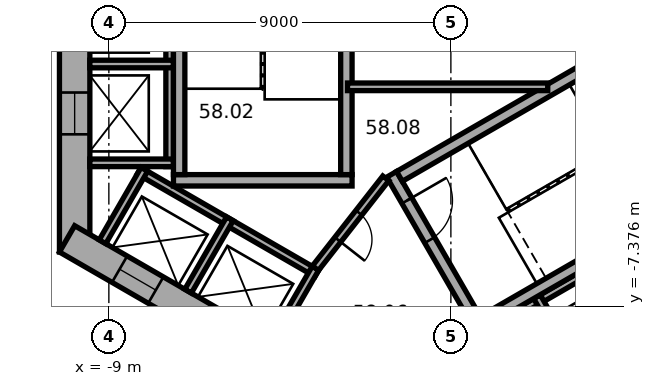
"""IFC4 building model, lengths in metres.
Left out: names, types, materials, properties, quantities, classifications, styles, units other than length and angle.
Written with IfcOpenShell. Run it as: python <this file> out.ifc"""

import sys

from ifc_helpers import new_model, si_unit, direction, frame, frame_2d, origin, place, context, subcontext, project, spatial, rectangle, extrude, element, fill, save


model = new_model("IFC4")
c1 = context("Model", 3, precision=1e-05, world=origin(), true_north=direction((0.0, 1.0)))
c2 = subcontext(c1, "Body", "Model", "MODEL_VIEW")
j1 = project(units=[si_unit("LENGTHUNIT", "METRE"), si_unit("PLANEANGLEUNIT", "RADIAN")], contexts=[c1])
p1 = place(None, origin())
s1 = spatial("IfcSite", under=j1, at=p1, CompositionType="ELEMENT")
p2 = place(p1, origin())
s2 = spatial("IfcBuilding", under=s1, at=p2, CompositionType="ELEMENT")
p3 = place(p2, frame((0.0, 0.0, 236.5)))
s3 = spatial("IfcBuildingStorey", under=s2, at=p3, CompositionType="ELEMENT", Elevation=236.5)
p4 = place(p3, frame((-9.9, 5.947, 0.0), z_axis=(0.0, 0.0, 1.0), x_axis=(0.0, -1.0, 0.0)))
e1 = element("IfcWall", 1, at=p4, inside=s3, PredefinedType="SHEAR", context=c2, shape_type="SweptSolid", body=[
    extrude(rectangle(XDim=11.894, YDim=0.8, at=frame_2d((5.947, 0.0))), origin(), (0.0, 0.0, 1.0), 3.7),
])
p5 = place(p4, frame((5.097, 0.0, 0.0)))
e2 = element("IfcOpeningElement", 2, at=p5, cuts=e1, PredefinedType="OPENING", context=c2, shape_type="SweptSolid", body=[
    extrude(rectangle(XDim=1.1, YDim=2.1, at=frame_2d((0.55, 1.05))), frame((0.0, 0.41, 0.0), z_axis=(0.0, -1.0, 0.0), x_axis=(1.0, 0.0, 0.0)), (0.0, 0.0, 1.0), 0.82),
])
p6 = place(p4, frame((7.697, 0.0, 0.0)))
e3 = element("IfcOpeningElement", 3, at=p6, cuts=e1, PredefinedType="OPENING", context=c2, shape_type="SweptSolid", body=[
    extrude(rectangle(XDim=1.1, YDim=2.1, at=frame_2d((0.55, 1.05))), frame((0.0, 0.41, 0.0), z_axis=(0.0, -1.0, 0.0), x_axis=(1.0, 0.0, 0.0)), (0.0, 0.0, 1.0), 0.82),
])
p7 = place(p3, frame((-10.1, -5.6, 0.0), z_axis=(0.0, 0.0, 1.0), x_axis=(0.866023897231, -0.500002609418, 0.0)))
e4 = element("IfcWall", 4, at=p7, inside=s3, PredefinedType="SHEAR", context=c2, shape_type="SweptSolid", body=[
    extrude(rectangle(XDim=11.894, YDim=0.8, at=frame_2d((5.947, 0.0))), origin(), (0.0, 0.0, 1.0), 3.7),
])
p8 = place(p7, frame((6.147, 0.0, 0.0)))
e5 = element("IfcOpeningElement", 5, at=p8, cuts=e4, PredefinedType="OPENING", context=c2, shape_type="SweptSolid", body=[
    extrude(rectangle(XDim=1.5, YDim=2.1, at=frame_2d((0.75, 1.05))), frame((0.0, 0.41, 0.0), z_axis=(0.0, -1.0, 0.0), x_axis=(1.0, 0.0, 0.0)), (0.0, 0.0, 1.0), 0.82),
])
p9 = place(p7, frame((1.597, 0.0, 0.0)))
e6 = element("IfcOpeningElement", 6, at=p9, cuts=e4, PredefinedType="OPENING", context=c2, shape_type="SweptSolid", body=[
    extrude(rectangle(XDim=1.1, YDim=2.1, at=frame_2d((0.55, 1.05))), frame((0.0, 0.41, 0.0), z_axis=(0.0, -1.0, 0.0), x_axis=(1.0, 0.0, 0.0)), (0.0, 0.0, 1.0), 0.82),
])
p10 = place(p7, frame((4.197, 0.0, 0.0)))
e7 = element("IfcOpeningElement", 7, at=p10, cuts=e4, PredefinedType="OPENING", context=c2, shape_type="SweptSolid", body=[
    extrude(rectangle(XDim=1.1, YDim=2.1, at=frame_2d((0.55, 1.05))), frame((0.0, 0.41, 0.0), z_axis=(0.0, -1.0, 0.0), x_axis=(1.0, 0.0, 0.0)), (0.0, 0.0, 1.0), 0.82),
])
p11 = place(p3, frame((-0.2, -11.547, 0.0), z_axis=(0.0, 0.0, 1.0), x_axis=(0.866023897231, 0.500002609418, 0.0)))
e8 = element("IfcWall", 8, at=p11, inside=s3, PredefinedType="SHEAR", context=c2, shape_type="SweptSolid", body=[
    extrude(rectangle(XDim=11.894, YDim=0.8, at=frame_2d((5.947, 0.0))), origin(), (0.0, 0.0, 1.0), 3.7),
])
p12 = place(p11, frame((2.497, 0.0, 0.0)))
e9 = element("IfcOpeningElement", 9, at=p12, cuts=e8, PredefinedType="OPENING", context=c2, shape_type="SweptSolid", body=[
    extrude(rectangle(XDim=1.1, YDim=2.1, at=frame_2d((0.55, 1.05))), frame((0.0, 0.41, 0.0), z_axis=(0.0, -1.0, 0.0), x_axis=(1.0, 0.0, 0.0)), (0.0, 0.0, 1.0), 0.82),
])
p13 = place(p11, frame((5.097, 0.0, 0.0)))
e10 = element("IfcOpeningElement", 10, at=p13, cuts=e8, PredefinedType="OPENING", context=c2, shape_type="SweptSolid", body=[
    extrude(rectangle(XDim=1.1, YDim=2.1, at=frame_2d((0.55, 1.05))), frame((0.0, 0.41, 0.0), z_axis=(0.0, -1.0, 0.0), x_axis=(1.0, 0.0, 0.0)), (0.0, 0.0, 1.0), 0.82),
])
p14 = place(p11, frame((7.697, 0.0, 0.0)))
e11 = element("IfcOpeningElement", 11, at=p14, cuts=e8, PredefinedType="OPENING", context=c2, shape_type="SweptSolid", body=[
    extrude(rectangle(XDim=1.1, YDim=2.1, at=frame_2d((0.55, 1.05))), frame((0.0, 0.41, 0.0), z_axis=(0.0, -1.0, 0.0), x_axis=(1.0, 0.0, 0.0)), (0.0, 0.0, 1.0), 0.82),
])
p15 = place(p3, frame((-7.4, 4.3, 0.0), z_axis=(0.0, 0.0, 1.0), x_axis=(0.0, -1.0, 0.0)))
e12 = element("IfcWall", 12, at=p15, inside=s3, PredefinedType="PARTITIONING", context=c2, shape_type="SweptSolid", body=[
    extrude(rectangle(XDim=8.0, YDim=0.2, at=frame_2d((4.0, 0.0))), origin(), (0.0, 0.0, 1.0), 3.42),
])
for number, where, z_axis, x_axis in (
    (13, (-7.3, -1.0, 0.0), (0.0, 0.0, 1.0), (-1.0, 0.0, 0.0)),
    (14, (-7.3, -3.6, 0.0), (0.0, 0.0, 1.0), (-1.0, 0.0, 0.0)),
):
    element("IfcWall", number, at=place(p3, frame(where, z_axis=z_axis, x_axis=x_axis)), inside=s3, PredefinedType="PARTITIONING", context=c2, shape_type="SweptSolid", body=[
        extrude(rectangle(XDim=2.2, YDim=0.2, at=frame_2d((1.1, 0.0))), origin(), (0.0, 0.0, 1.0), 3.42),
    ])
p16 = place(p3, frame((-8.203, -3.809, 0.0), z_axis=(0.0, 0.0, 1.0), x_axis=(0.866028230842, -0.499995103361, 0.0)))
e15 = element("IfcWall", 15, at=p16, inside=s3, PredefinedType="PARTITIONING", context=c2, shape_type="SweptSolid", body=[
    extrude(rectangle(XDim=5.4, YDim=0.2, at=frame_2d((2.7, 0.0))), origin(), (0.0, 0.0, 1.0), 3.42),
])
for number, where, z_axis, x_axis in (
    (16, (-8.067, -3.772, 0.0), (0.0, 0.0, 1.0), (-0.5, -0.866, 0.0)),
    (17, (-5.815, -5.072, 0.0), (0.0, 0.0, 1.0), (-0.5, -0.866, 0.0)),
):
    element("IfcWall", number, at=place(p3, frame(where, z_axis=z_axis, x_axis=x_axis)), inside=s3, PredefinedType="PARTITIONING", context=c2, shape_type="SweptSolid", body=[
        extrude(rectangle(XDim=2.2, YDim=0.2, at=frame_2d((1.1, 0.0))), origin(), (0.0, 0.0, 1.0), 3.42),
    ])
p17 = place(p3, frame((-3.563, -6.372, 0.0), z_axis=(0.0, 0.0, 1.0), x_axis=(-0.499994660107, -0.866028486751, 0.0)))
e18 = element("IfcWall", 18, at=p17, inside=s3, PredefinedType="PARTITIONING", context=c2, shape_type="SweptSolid", body=[
    extrude(rectangle(XDim=2.2, YDim=0.2, at=frame_2d((1.1, 0.0))), origin(), (0.0, 0.0, 1.0), 3.42),
])
p18 = place(p3, frame((-0.024, -8.559, 0.0), z_axis=(0.0, 0.0, 1.0), x_axis=(0.866026010844, 0.49999894854, 0.0)))
e19 = element("IfcWall", 19, at=p18, inside=s3, PredefinedType="PARTITIONING", context=c2, shape_type="SweptSolid", body=[
    extrude(rectangle(XDim=8.0, YDim=0.2, at=frame_2d((4.0, 0.0))), origin(), (0.0, 0.0, 1.0), 3.42),
])
p19 = place(p3, frame((2.264, -7.122, 0.0), z_axis=(0.0, 0.0, 1.0), x_axis=(0.500077893725, -0.86598042715, 0.0)))
e20 = element("IfcWall", 20, at=p19, inside=s3, PredefinedType="PARTITIONING", context=c2, shape_type="SweptSolid", body=[
    extrude(rectangle(XDim=2.2, YDim=0.2, at=frame_2d((1.1, 0.0))), origin(), (0.0, 0.0, 1.0), 3.42),
])
p20 = place(p3, frame((-2.6, -4.06, 0.0), z_axis=(0.0, 0.0, 1.0), x_axis=(-1.0, 0.0, 0.0)))
e21 = element("IfcWall", 21, at=p20, inside=s3, PredefinedType="SHEAR", context=c2, shape_type="SweptSolid", body=[
    extrude(rectangle(XDim=4.7, YDim=0.3, at=frame_2d((2.35, 0.0))), origin(), (0.0, 0.0, 1.0), 3.42),
])
for number, where, z_axis, x_axis in (
    (22, (-2.75, 3.15, 0.0), (0.0, 0.0, 1.0), (0.0, -1.0, 0.0)),
    (23, (-7.15, 3.15, 0.0), (0.0, 0.0, 1.0), (0.0, -1.0, 0.0)),
):
    element("IfcWall", number, at=place(p3, frame(where, z_axis=z_axis, x_axis=x_axis)), inside=s3, PredefinedType="SHEAR", context=c2, shape_type="SweptSolid", body=[
        extrude(rectangle(XDim=7.06, YDim=0.3, at=frame_2d((3.53, 0.0))), origin(), (0.0, 0.0, 1.0), 3.42),
    ])
p21 = place(p3, frame((-1.558, -3.902, 0.0), z_axis=(0.0, 0.0, 1.0), x_axis=(0.499977259774, -0.866038532462, 0.0)))
e24 = element("IfcWall", 24, at=p21, inside=s3, PredefinedType="SHEAR", context=c2, shape_type="SweptSolid", body=[
    extrude(rectangle(XDim=4.7, YDim=0.3, at=frame_2d((2.35, 0.0))), origin(), (0.0, 0.0, 1.0), 3.42),
])
p22 = place(p21, frame((0.8, 0.0, 0.0)))
e25 = element("IfcOpeningElement", 25, at=p22, cuts=e24, PredefinedType="OPENING", context=c2, shape_type="SweptSolid", body=[
    extrude(rectangle(XDim=1.2, YDim=2.1, at=frame_2d((0.6, 1.05))), frame((0.0, 0.16, 0.0), z_axis=(0.0, -1.0, 0.0), x_axis=(1.0, 0.0, 0.0)), (0.0, 0.0, 1.0), 0.32),
])
for number, where, z_axis, x_axis in (
    (26, (-1.353, -3.957, 0.0), (0.0, 0.0, 1.0), (0.866, 0.5, 0.0)),
    (27, (0.847, -7.767, 0.0), (0.0, 0.0, 1.0), (0.866, 0.5, 0.0)),
):
    element("IfcWall", number, at=place(p3, frame(where, z_axis=z_axis, x_axis=x_axis)), inside=s3, PredefinedType="SHEAR", context=c2, shape_type="SweptSolid", body=[
        extrude(rectangle(XDim=7.06, YDim=0.3, at=frame_2d((3.53, 0.0))), origin(), (0.0, 0.0, 1.0), 3.42),
    ])
p23 = place(p3, frame((-1.712, -4.008, 0.0), z_axis=(0.0, 0.0, 1.0), x_axis=(-0.616549420702, -0.787316208287, 0.0)))
e28 = element("IfcWall", 28, at=p23, inside=s3, PredefinedType="PARTITIONING", context=c2, shape_type="SweptSolid", body=[
    extrude(rectangle(XDim=3.002, YDim=0.2, at=frame_2d((1.501, 0.0))), origin(), (0.0, 0.0, 1.0), 3.42),
])
p24 = place(p23, frame((1.15, 0.0, 0.0)))
e29 = element("IfcOpeningElement", 29, at=p24, cuts=e28, PredefinedType="OPENING", context=c2, shape_type="SweptSolid", body=[
    extrude(rectangle(XDim=0.9, YDim=2.1, at=frame_2d((0.45, 1.05))), frame((0.0, 0.11, 0.0), z_axis=(0.0, -1.0, 0.0), x_axis=(1.0, 0.0, 0.0)), (0.0, 0.0, 1.0), 0.22),
])
p25 = place(p3, frame((-2.72, -1.6, 0.0), z_axis=(0.0, 0.0, 1.0), x_axis=(1.0, 0.0, 0.0)))
e30 = element("IfcWall", 30, at=p25, inside=s3, PredefinedType="PARTITIONING", context=c2, shape_type="SweptSolid", body=[
    extrude(rectangle(XDim=5.269, YDim=0.2, at=frame_2d((2.634, 0.0))), origin(), (0.0, 0.0, 1.0), 3.42),
])
p26 = place(p22, origin())
e31 = element("IfcDoor", 31, at=p26, inside=s3, OperationType="SINGLE_SWING_RIGHT", PredefinedType="DOOR", context=c2, shape_type="SweptSolid", body=[
    extrude(rectangle(XDim=1.2, YDim=2.1, at=frame_2d((0.6, 1.05))), frame((0.0, 0.025, 0.0), z_axis=(0.0, -1.0, 0.0), x_axis=(1.0, 0.0, 0.0)), (0.0, 0.0, 1.0), 0.05),
])
fill(e25, e31)
p27 = place(p24, origin())
e32 = element("IfcDoor", 32, at=p27, inside=s3, OperationType="SINGLE_SWING_LEFT", PredefinedType="DOOR", context=c2, shape_type="SweptSolid", body=[
    extrude(rectangle(XDim=0.9, YDim=2.1, at=frame_2d((0.45, 1.05))), frame((0.0, 0.025, 0.0), z_axis=(0.0, -1.0, 0.0), x_axis=(1.0, 0.0, 0.0)), (0.0, 0.0, 1.0), 0.05),
])
fill(e29, e32)
p28 = place(p6, origin())
e33 = element("IfcDoor", 33, at=p28, inside=s3, OperationType="DOUBLE_DOOR_SLIDING", PredefinedType="DOOR", context=c2, shape_type="SweptSolid", body=[
    extrude(rectangle(XDim=1.1, YDim=2.1, at=frame_2d((0.55, 1.05))), frame((0.0, 0.025, 0.0), z_axis=(0.0, -1.0, 0.0), x_axis=(1.0, 0.0, 0.0)), (0.0, 0.0, 1.0), 0.05),
])
fill(e3, e33)
p29 = place(p9, origin())
e34 = element("IfcDoor", 34, at=p29, inside=s3, OperationType="DOUBLE_DOOR_SLIDING", PredefinedType="DOOR", context=c2, shape_type="SweptSolid", body=[
    extrude(rectangle(XDim=1.1, YDim=2.1, at=frame_2d((0.55, 1.05))), frame((0.0, 0.025, 0.0), z_axis=(0.0, -1.0, 0.0), x_axis=(1.0, 0.0, 0.0)), (0.0, 0.0, 1.0), 0.05),
])
fill(e6, e34)
save(model, sys.argv[1])
